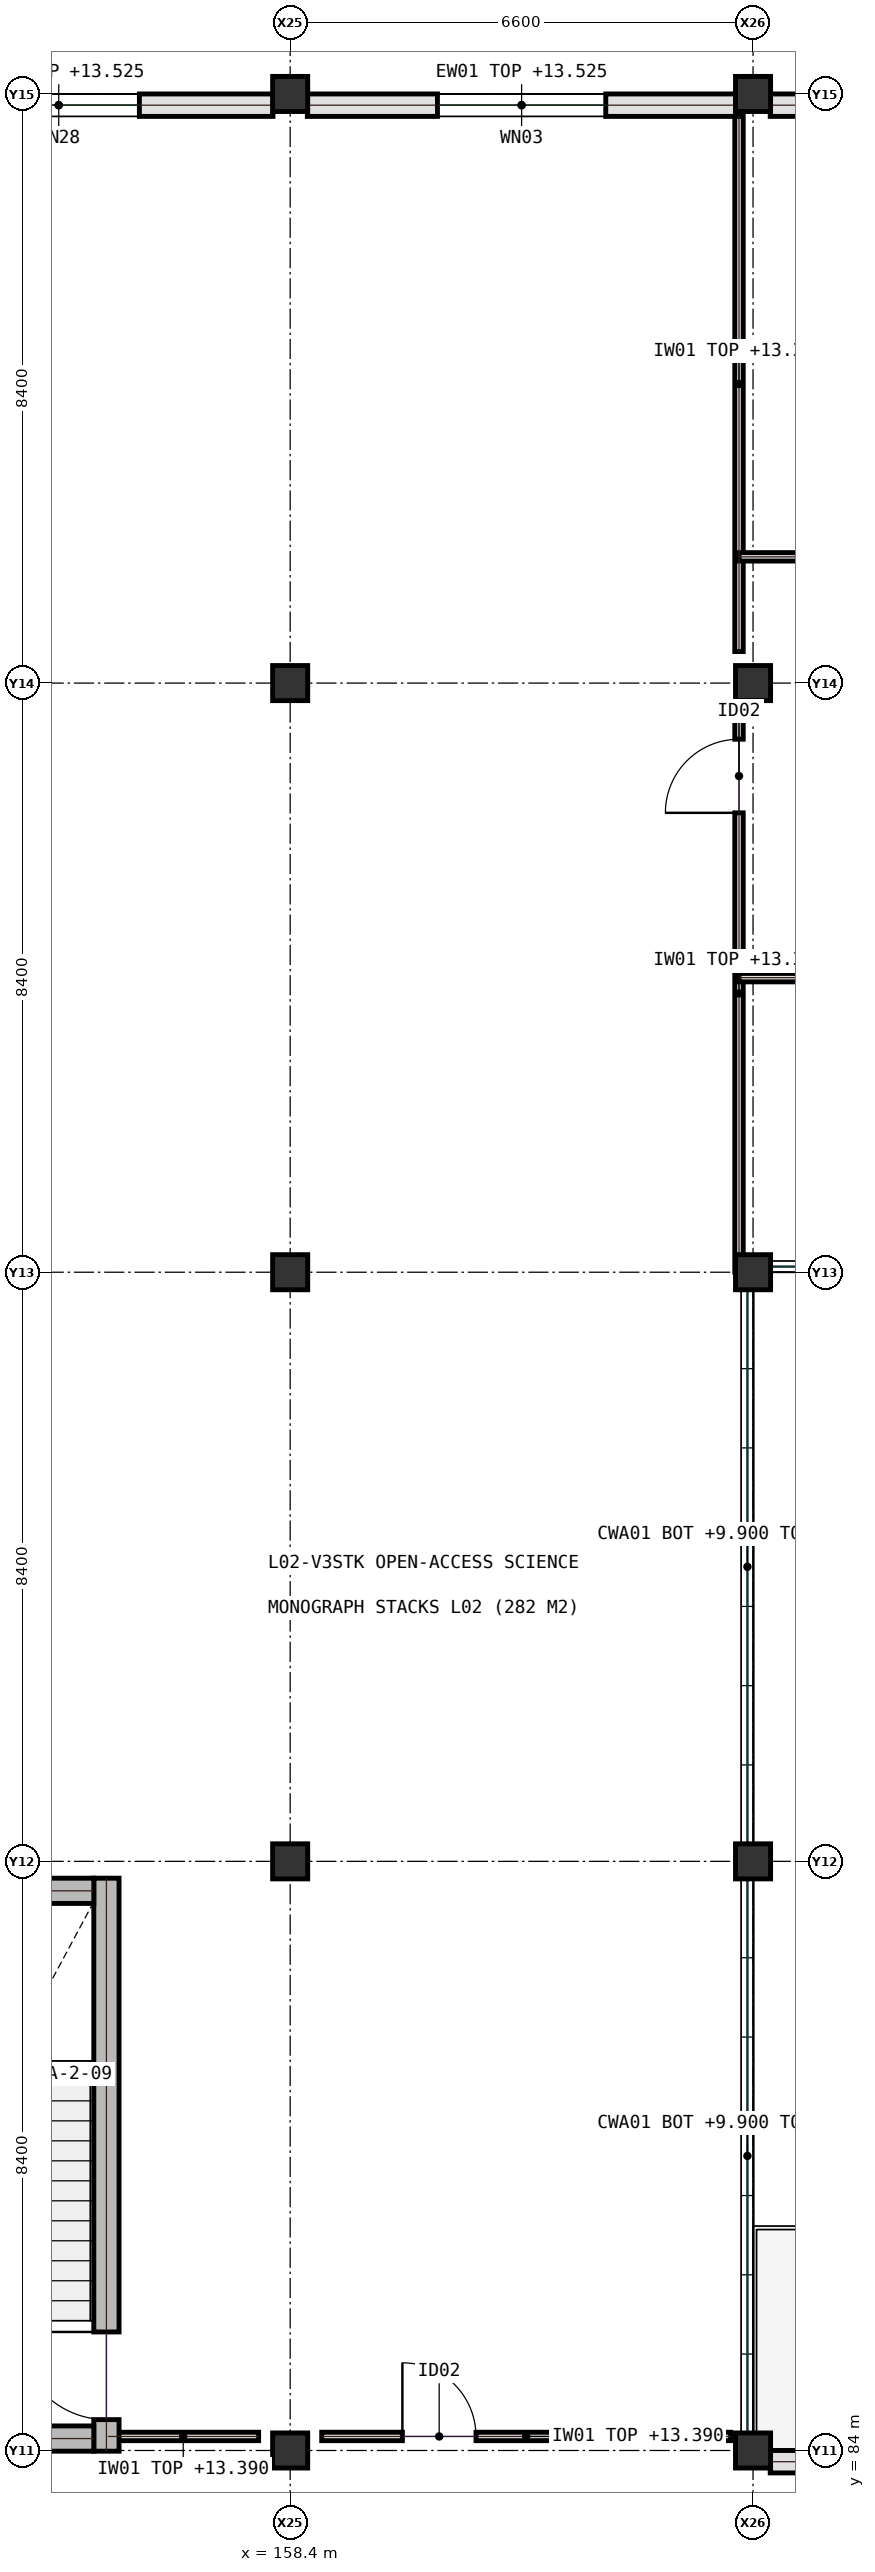
"""IFC4 building model, lengths in metres.
Left out: names, types, materials, properties, quantities, classifications, styles, units other than length and angle.
Written with IfcOpenShell. Run it as: python <this file> out.ifc"""

import sys

from ifc_helpers import new_model, si_unit, direction, frame, frame_2d, origin, origin_2d, place, context, subcontext, project, spatial, rectangle, extrude, element, fill, save


model = new_model("IFC4")
c1 = context("Model", 3, precision=1e-05, world=origin(), true_north=direction((0.0, 1.0)))
c2 = subcontext(c1, "Body", "Model", "MODEL_VIEW")
j1 = project(units=[si_unit("LENGTHUNIT", "METRE"), si_unit("PLANEANGLEUNIT", "RADIAN")], contexts=[c1])
p1 = place(None, origin())
s1 = spatial("IfcSite", under=j1, at=p1, CompositionType="ELEMENT")
p2 = place(p1, origin())
s2 = spatial("IfcBuilding", under=s1, at=p2, CompositionType="ELEMENT")
p3 = place(p2, frame((0.0, 0.0, 9.9)))
s3 = spatial("IfcBuildingStorey", under=s2, at=p3, CompositionType="ELEMENT", Elevation=9.9)
for number, where, z_axis, x_axis in (
    (1, (158.4, 84.0, 0.0), (0.0, 0.0, 1.0), (1.0, 0.0, 0.0)),
    (2, (158.4, 92.4, 0.0), (0.0, 0.0, 1.0), (1.0, 0.0, 0.0)),
    (3, (158.4, 100.8, 0.0), (0.0, 0.0, 1.0), (1.0, 0.0, 0.0)),
    (4, (158.4, 109.2, 0.0), (0.0, 0.0, 1.0), (1.0, 0.0, 0.0)),
    (5, (158.4, 117.6, 0.0), (0.0, 0.0, 1.0), (1.0, 0.0, 0.0)),
    (6, (165.0, 84.0, 0.0), (0.0, 0.0, 1.0), (1.0, 0.0, 0.0)),
    (7, (165.0, 92.4, 0.0), (0.0, 0.0, 1.0), (1.0, 0.0, 0.0)),
    (8, (165.0, 100.8, 0.0), (0.0, 0.0, 1.0), (1.0, 0.0, 0.0)),
    (9, (165.0, 109.2, 0.0), (0.0, 0.0, 1.0), (1.0, 0.0, 0.0)),
    (10, (165.0, 117.6, 0.0), (0.0, 0.0, 1.0), (1.0, 0.0, 0.0)),
):
    element("IfcColumn", number, at=place(p3, frame(where, z_axis=z_axis, x_axis=x_axis)), inside=s3, PredefinedType="COLUMN", context=c2, shape_type="SweptSolid", body=[
        extrude(rectangle(XDim=0.5, YDim=0.5, at=origin_2d()), origin(), (0.0, 0.0, 1.0), 4.5),
    ])
p4 = place(p3, frame((155.8, 84.2, 0.0), z_axis=(0.0, 0.0, 1.0), x_axis=(1.0, 0.0, 0.0)))
e11 = element("IfcWall", 11, at=p4, inside=s3, PredefinedType="PARTITIONING", context=c2, shape_type="SweptSolid", body=[
    extrude(rectangle(XDim=2.15, YDim=0.12, at=frame_2d((1.075, 0.0))), origin(), (0.0, 0.0, 1.0), 3.49),
])
p5 = place(p3, frame((158.85, 84.2, 0.0), z_axis=(0.0, 0.0, 1.0), x_axis=(1.0, 0.0, 0.0)))
e12 = element("IfcWall", 12, at=p5, inside=s3, PredefinedType="PARTITIONING", context=c2, shape_type="SweptSolid", body=[
    extrude(rectangle(XDim=5.83, YDim=0.12, at=frame_2d((2.915, 0.0))), origin(), (0.0, 0.0, 1.0), 3.49),
])
p6 = place(p5, frame((1.15, 0.0, 0.0)))
e13 = element("IfcOpeningElement", 13, at=p6, cuts=e12, PredefinedType="OPENING", context=c2, shape_type="SweptSolid", body=[
    extrude(rectangle(XDim=1.05, YDim=2.15, at=frame_2d((0.525, 1.075))), frame((0.0, 0.07, 0.0), z_axis=(0.0, -1.0, 0.0), x_axis=(1.0, 0.0, 0.0)), (0.0, 0.0, 1.0), 0.14),
])
p7 = place(p3, frame((164.8, 100.8, 0.0), z_axis=(0.0, 0.0, 1.0), x_axis=(0.0, 1.0, 0.0)))
e14 = element("IfcWall", 14, at=p7, inside=s3, PredefinedType="PARTITIONING", context=c2, shape_type="SweptSolid", body=[
    extrude(rectangle(XDim=7.95, YDim=0.12, at=frame_2d((3.975, 0.0))), origin(), (0.0, 0.0, 1.0), 3.49),
])
p8 = place(p7, frame((6.55, 0.0, 0.0)))
e15 = element("IfcOpeningElement", 15, at=p8, cuts=e14, PredefinedType="OPENING", context=c2, shape_type="SweptSolid", body=[
    extrude(rectangle(XDim=1.05, YDim=2.15, at=frame_2d((0.525, 1.075))), frame((0.0, 0.07, 0.0), z_axis=(0.0, -1.0, 0.0), x_axis=(1.0, 0.0, 0.0)), (0.0, 0.0, 1.0), 0.14),
])
p9 = place(p3, frame((164.8, 109.65, 0.0), z_axis=(0.0, 0.0, 1.0), x_axis=(0.0, 1.0, 0.0)))
e16 = element("IfcWall", 16, at=p9, inside=s3, PredefinedType="PARTITIONING", context=c2, shape_type="SweptSolid", body=[
    extrude(rectangle(XDim=7.63, YDim=0.12, at=frame_2d((3.815, 0.0))), origin(), (0.0, 0.0, 1.0), 3.49),
])
p10 = place(p3, frame((164.8, 105.0, 0.0), z_axis=(0.0, 0.0, 1.0), x_axis=(1.0, 0.0, 0.0)))
e17 = element("IfcWall", 17, at=p10, inside=s3, PredefinedType="PARTITIONING", context=c2, shape_type="SweptSolid", body=[
    extrude(rectangle(XDim=13.2, YDim=0.12, at=frame_2d((6.6, 0.0))), origin(), (0.0, 0.0, 1.0), 3.49),
])
p11 = place(p10, frame((4.0, 0.0, 0.0)))
e18 = element("IfcOpeningElement", 18, at=p11, cuts=e17, PredefinedType="OPENING", context=c2, shape_type="SweptSolid", body=[
    extrude(rectangle(XDim=1.45, YDim=2.25, at=frame_2d((0.725, 1.125))), frame((0.0, 0.07, 0.0), z_axis=(0.0, -1.0, 0.0), x_axis=(1.0, 0.0, 0.0)), (0.0, 0.0, 1.0), 0.14),
])
p12 = place(p10, frame((9.0, 0.0, 0.0)))
e19 = element("IfcOpeningElement", 19, at=p12, cuts=e17, PredefinedType="OPENING", context=c2, shape_type="SweptSolid", body=[
    extrude(rectangle(XDim=1.45, YDim=2.25, at=frame_2d((0.725, 1.125))), frame((0.0, 0.07, 0.0), z_axis=(0.0, -1.0, 0.0), x_axis=(1.0, 0.0, 0.0)), (0.0, 0.0, 1.0), 0.14),
])
p13 = place(p3, frame((164.8, 111.0, 0.0), z_axis=(0.0, 0.0, 1.0), x_axis=(1.0, 0.0, 0.0)))
e20 = element("IfcWall", 20, at=p13, inside=s3, PredefinedType="PARTITIONING", context=c2, shape_type="SweptSolid", body=[
    extrude(rectangle(XDim=13.2, YDim=0.12, at=frame_2d((6.6, 0.0))), origin(), (0.0, 0.0, 1.0), 3.49),
])
p14 = place(p13, frame((4.0, 0.0, 0.0)))
e21 = element("IfcOpeningElement", 21, at=p14, cuts=e20, PredefinedType="OPENING", context=c2, shape_type="SweptSolid", body=[
    extrude(rectangle(XDim=0.9, YDim=2.1, at=frame_2d((0.45, 1.05))), frame((0.0, 0.07, 0.0), z_axis=(0.0, -1.0, 0.0), x_axis=(1.0, 0.0, 0.0)), (0.0, 0.0, 1.0), 0.14),
])
p15 = place(p13, frame((9.0, 0.0, 0.0)))
e22 = element("IfcOpeningElement", 22, at=p15, cuts=e20, PredefinedType="OPENING", context=c2, shape_type="SweptSolid", body=[
    extrude(rectangle(XDim=0.9, YDim=2.1, at=frame_2d((0.45, 1.05))), frame((0.0, 0.07, 0.0), z_axis=(0.0, -1.0, 0.0), x_axis=(1.0, 0.0, 0.0)), (0.0, 0.0, 1.0), 0.14),
])
p16 = place(p3, frame((158.155, 117.44, 0.0), z_axis=(0.0, 0.0, 1.0), x_axis=(-1.0, 0.0, 0.0)))
e23 = element("IfcWall", 23, at=p16, inside=s3, PredefinedType="SOLIDWALL", context=c2, shape_type="SweptSolid", body=[
    extrude(rectangle(XDim=6.11, YDim=0.32, at=frame_2d((3.055, 0.0))), origin(), (0.0, 0.0, 1.0), 3.625),
])
p17 = place(p16, frame((1.905, 0.0, 0.95)))
e24 = element("IfcOpeningElement", 24, at=p17, cuts=e23, PredefinedType="OPENING", context=c2, shape_type="SweptSolid", body=[
    extrude(rectangle(XDim=2.3, YDim=1.95, at=frame_2d((1.15, 0.975))), frame((0.0, 0.17, 0.0), z_axis=(0.0, -1.0, 0.0), x_axis=(1.0, 0.0, 0.0)), (0.0, 0.0, 1.0), 0.34),
])
p18 = place(p3, frame((164.755, 117.44, 0.0), z_axis=(0.0, 0.0, 1.0), x_axis=(-1.0, 0.0, 0.0)))
e25 = element("IfcWall", 25, at=p18, inside=s3, PredefinedType="SOLIDWALL", context=c2, shape_type="SweptSolid", body=[
    extrude(rectangle(XDim=6.11, YDim=0.32, at=frame_2d((3.055, 0.0))), origin(), (0.0, 0.0, 1.0), 3.625),
])
p19 = place(p18, frame((1.855, 0.0, 0.95)))
e26 = element("IfcOpeningElement", 26, at=p19, cuts=e25, PredefinedType="OPENING", context=c2, shape_type="SweptSolid", body=[
    extrude(rectangle(XDim=2.4, YDim=1.6, at=frame_2d((1.2, 0.8))), frame((0.0, 0.17, 0.0), z_axis=(0.0, -1.0, 0.0), x_axis=(1.0, 0.0, 0.0)), (0.0, 0.0, 1.0), 0.34),
])
p20 = place(p3, frame((171.355, 83.84, 0.0), z_axis=(0.0, 0.0, 1.0), x_axis=(-1.0, 0.0, 0.0)))
e27 = element("IfcWall", 27, at=p20, inside=s3, PredefinedType="SOLIDWALL", context=c2, shape_type="SweptSolid", body=[
    extrude(rectangle(XDim=6.11, YDim=0.32, at=frame_2d((3.055, 0.0))), origin(), (0.0, 0.0, 1.0), 3.625),
])
p21 = place(p20, frame((2.505, 0.0, 0.0)))
e28 = element("IfcOpeningElement", 28, at=p21, cuts=e27, PredefinedType="OPENING", context=c2, shape_type="SweptSolid", body=[
    extrude(rectangle(XDim=1.1, YDim=2.2, at=frame_2d((0.55, 1.1))), frame((0.0, 0.17, 0.0), z_axis=(0.0, -1.0, 0.0), x_axis=(1.0, 0.0, 0.0)), (0.0, 0.0, 1.0), 0.34),
])
p22 = place(p3, frame((171.355, 117.44, 0.0), z_axis=(0.0, 0.0, 1.0), x_axis=(-1.0, 0.0, 0.0)))
e29 = element("IfcWall", 29, at=p22, inside=s3, PredefinedType="SOLIDWALL", context=c2, shape_type="SweptSolid", body=[
    extrude(rectangle(XDim=6.11, YDim=0.32, at=frame_2d((3.055, 0.0))), origin(), (0.0, 0.0, 1.0), 3.625),
])
p23 = place(p22, frame((1.255, 0.0, 0.95)))
e30 = element("IfcOpeningElement", 30, at=p23, cuts=e29, PredefinedType="OPENING", context=c2, shape_type="SweptSolid", body=[
    extrude(rectangle(XDim=3.6, YDim=2.0, at=frame_2d((1.8, 1.0))), frame((0.0, 0.17, 0.0), z_axis=(0.0, -1.0, 0.0), x_axis=(1.0, 0.0, 0.0)), (0.0, 0.0, 1.0), 0.34),
])
p24 = place(p3, frame((155.78, 83.99, 0.0), z_axis=(0.0, 0.0, 1.0), x_axis=(0.0, 1.0, 0.0)))
e31 = element("IfcWall", 31, at=p24, inside=s3, PredefinedType="SHEAR", context=c2, shape_type="SweptSolid", body=[
    extrude(rectangle(XDim=8.17, YDim=0.36, at=frame_2d((4.085, 0.0))), origin(), (0.0, 0.0, 1.0), 4.24),
])
p25 = place(p24, frame((0.45, 0.0, 0.0)))
e32 = element("IfcOpeningElement", 32, at=p25, cuts=e31, PredefinedType="OPENING", context=c2, shape_type="SweptSolid", body=[
    extrude(rectangle(XDim=1.25, YDim=2.15, at=frame_2d((0.625, 1.075))), frame((0.0, 0.19, 0.0), z_axis=(0.0, -1.0, 0.0), x_axis=(1.0, 0.0, 0.0)), (0.0, 0.0, 1.0), 0.38),
])
for number, where, z_axis, x_axis in (
    (33, (152.4, 91.98, 0.0), (0.0, 0.0, 1.0), (1.0, 0.0, 0.0)),
    (34, (152.4, 84.17, 0.0), (0.0, 0.0, 1.0), (1.0, 0.0, 0.0)),
):
    element("IfcWall", number, at=place(p3, frame(where, z_axis=z_axis, x_axis=x_axis)), inside=s3, PredefinedType="SHEAR", context=c2, shape_type="SweptSolid", body=[
        extrude(rectangle(XDim=3.2, YDim=0.36, at=frame_2d((1.6, 0.0))), origin(), (0.0, 0.0, 1.0), 4.24),
    ])
p26 = place(p6, origin())
e35 = element("IfcDoor", 35, at=p26, inside=s3, OperationType="SINGLE_SWING_LEFT", PredefinedType="DOOR", context=c2, shape_type="SweptSolid", body=[
    extrude(rectangle(XDim=1.05, YDim=2.15, at=frame_2d((0.525, 1.075))), frame((0.0, 0.025, 0.0), z_axis=(0.0, -1.0, 0.0), x_axis=(1.0, 0.0, 0.0)), (0.0, 0.0, 1.0), 0.05),
])
fill(e13, e35)
p27 = place(p8, origin())
e36 = element("IfcDoor", 36, at=p27, inside=s3, OperationType="SINGLE_SWING_LEFT", PredefinedType="DOOR", context=c2, shape_type="SweptSolid", body=[
    extrude(rectangle(XDim=1.05, YDim=2.15, at=frame_2d((0.525, 1.075))), frame((0.0, 0.025, 0.0), z_axis=(0.0, -1.0, 0.0), x_axis=(1.0, 0.0, 0.0)), (0.0, 0.0, 1.0), 0.05),
])
fill(e15, e36)
p28 = place(p17, origin())
e37 = element("IfcWindow", 37, at=p28, inside=s3, PartitioningType="SINGLE_PANEL", PredefinedType="WINDOW", context=c2, shape_type="SweptSolid", body=[
    extrude(rectangle(XDim=2.3, YDim=1.95, at=frame_2d((1.15, 0.975))), frame((0.0, 0.03, 0.0), z_axis=(0.0, -1.0, 0.0), x_axis=(1.0, 0.0, 0.0)), (0.0, 0.0, 1.0), 0.06),
])
fill(e24, e37)
p29 = place(p19, origin())
e38 = element("IfcWindow", 38, at=p29, inside=s3, PartitioningType="SINGLE_PANEL", PredefinedType="WINDOW", context=c2, shape_type="SweptSolid", body=[
    extrude(rectangle(XDim=2.4, YDim=1.6, at=frame_2d((1.2, 0.8))), frame((0.0, 0.03, 0.0), z_axis=(0.0, -1.0, 0.0), x_axis=(1.0, 0.0, 0.0)), (0.0, 0.0, 1.0), 0.06),
])
fill(e26, e38)
p30 = place(p25, origin())
e39 = element("IfcDoor", 39, at=p30, inside=s3, OperationType="SINGLE_SWING_RIGHT", PredefinedType="DOOR", context=c2, shape_type="SweptSolid", body=[
    extrude(rectangle(XDim=1.25, YDim=2.15, at=frame_2d((0.625, 1.075))), frame((0.0, 0.025, 0.0), z_axis=(0.0, -1.0, 0.0), x_axis=(1.0, 0.0, 0.0)), (0.0, 0.0, 1.0), 0.05),
])
fill(e32, e39)
save(model, sys.argv[1])
